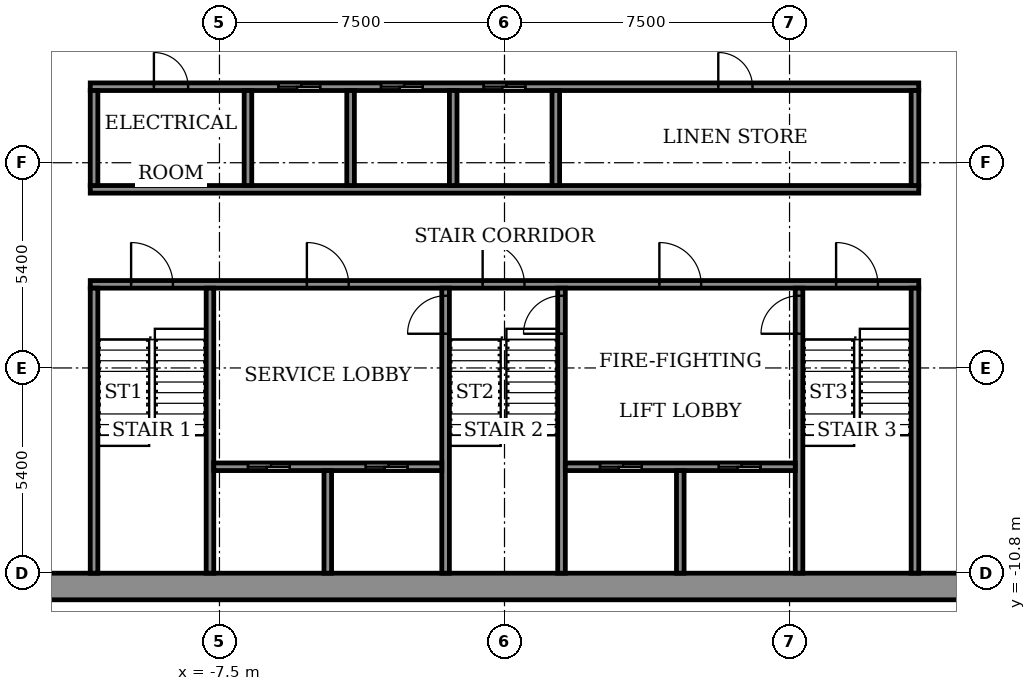
"""IFC4 building model, lengths in metres.
Left out: names, types, materials, properties, quantities, classifications, styles, units other than length and angle.
Written with IfcOpenShell. Run it as: python <this file> out.ifc"""

import sys

from ifc_helpers import new_model, si_unit, direction, frame, frame_2d, origin, place, context, subcontext, project, spatial, rectangle, extrude, element, fill, save


model = new_model("IFC4")
c1 = context("Model", 3, precision=1e-05, world=origin(), true_north=direction((0.0, 1.0)))
c2 = subcontext(c1, "Body", "Model", "MODEL_VIEW")
j1 = project(units=[si_unit("LENGTHUNIT", "METRE"), si_unit("PLANEANGLEUNIT", "RADIAN")], contexts=[c1])
p1 = place(None, origin())
s1 = spatial("IfcSite", under=j1, at=p1, CompositionType="ELEMENT")
p2 = place(p1, origin())
s2 = spatial("IfcBuilding", under=s1, at=p2, CompositionType="ELEMENT")
p3 = place(p2, frame((0.0, 0.0, 297.9)))
s3 = spatial("IfcBuildingStorey", under=s2, at=p3, CompositionType="ELEMENT", Elevation=297.9)
p4 = place(p3, frame((-14.5, -11.15, 0.0), z_axis=(0.0, 0.0, 1.0), x_axis=(1.0, 0.0, 0.0)))
e1 = element("IfcWall", 1, at=p4, inside=s3, PredefinedType="SHEAR", context=c2, shape_type="SweptSolid", body=[
    extrude(rectangle(XDim=29.0, YDim=0.7, at=frame_2d((14.5, 0.0))), origin(), (0.0, 0.0, 1.0), 3.6),
])
p5 = place(p3, frame((-10.9, -3.2, 0.0), z_axis=(0.0, 0.0, 1.0), x_axis=(1.0, 0.0, 0.0)))
e2 = element("IfcWall", 2, at=p5, inside=s3, PredefinedType="SHEAR", context=c2, shape_type="SweptSolid", body=[
    extrude(rectangle(XDim=21.8, YDim=0.2, at=frame_2d((10.9, 0.0))), origin(), (0.0, 0.0, 1.0), 3.05),
])
p6 = place(p5, frame((1.075, 0.0, 0.0)))
e3 = element("IfcOpeningElement", 3, at=p6, cuts=e2, PredefinedType="OPENING", context=c2, shape_type="SweptSolid", body=[
    extrude(rectangle(XDim=1.1, YDim=2.1, at=frame_2d((0.55, 1.05))), frame((0.0, 0.11, 0.0), z_axis=(0.0, -1.0, 0.0), x_axis=(1.0, 0.0, 0.0)), (0.0, 0.0, 1.0), 0.22),
])
p7 = place(p5, frame((10.325, 0.0, 0.0)))
e4 = element("IfcOpeningElement", 4, at=p7, cuts=e2, PredefinedType="OPENING", context=c2, shape_type="SweptSolid", body=[
    extrude(rectangle(XDim=1.1, YDim=2.1, at=frame_2d((0.55, 1.05))), frame((0.0, 0.11, 0.0), z_axis=(0.0, -1.0, 0.0), x_axis=(1.0, 0.0, 0.0)), (0.0, 0.0, 1.0), 0.22),
])
p8 = place(p5, frame((19.625, 0.0, 0.0)))
e5 = element("IfcOpeningElement", 5, at=p8, cuts=e2, PredefinedType="OPENING", context=c2, shape_type="SweptSolid", body=[
    extrude(rectangle(XDim=1.1, YDim=2.1, at=frame_2d((0.55, 1.05))), frame((0.0, 0.11, 0.0), z_axis=(0.0, -1.0, 0.0), x_axis=(1.0, 0.0, 0.0)), (0.0, 0.0, 1.0), 0.22),
])
p9 = place(p5, frame((5.7, 0.0, 0.0)))
e6 = element("IfcOpeningElement", 6, at=p9, cuts=e2, PredefinedType="OPENING", context=c2, shape_type="SweptSolid", body=[
    extrude(rectangle(XDim=1.1, YDim=2.1, at=frame_2d((0.55, 1.05))), frame((0.0, 0.11, 0.0), z_axis=(0.0, -1.0, 0.0), x_axis=(1.0, 0.0, 0.0)), (0.0, 0.0, 1.0), 0.22),
])
p10 = place(p5, frame((14.975, 0.0, 0.0)))
e7 = element("IfcOpeningElement", 7, at=p10, cuts=e2, PredefinedType="OPENING", context=c2, shape_type="SweptSolid", body=[
    extrude(rectangle(XDim=1.1, YDim=2.1, at=frame_2d((0.55, 1.05))), frame((0.0, 0.11, 0.0), z_axis=(0.0, -1.0, 0.0), x_axis=(1.0, 0.0, 0.0)), (0.0, 0.0, 1.0), 0.22),
])
p11 = place(p3, frame((-10.9, -0.7, 0.0), z_axis=(0.0, 0.0, 1.0), x_axis=(1.0, 0.0, 0.0)))
e8 = element("IfcWall", 8, at=p11, inside=s3, PredefinedType="SHEAR", context=c2, shape_type="SweptSolid", body=[
    extrude(rectangle(XDim=21.8, YDim=0.2, at=frame_2d((10.9, 0.0))), origin(), (0.0, 0.0, 1.0), 3.05),
])
p12 = place(p3, frame((-10.9, 2.0, 0.0), z_axis=(0.0, 0.0, 1.0), x_axis=(1.0, 0.0, 0.0)))
e9 = element("IfcWall", 9, at=p12, inside=s3, PredefinedType="SHEAR", context=c2, shape_type="SweptSolid", body=[
    extrude(rectangle(XDim=21.8, YDim=0.2, at=frame_2d((10.9, 0.0))), origin(), (0.0, 0.0, 1.0), 3.05),
])
p13 = place(p12, frame((4.95, 0.0, 0.0)))
e10 = element("IfcOpeningElement", 10, at=p13, cuts=e9, PredefinedType="OPENING", context=c2, shape_type="SweptSolid", body=[
    extrude(rectangle(XDim=1.1, YDim=2.1, at=frame_2d((0.55, 1.05))), frame((0.0, 0.11, 0.0), z_axis=(0.0, -1.0, 0.0), x_axis=(1.0, 0.0, 0.0)), (0.0, 0.0, 1.0), 0.22),
])
p14 = place(p12, frame((7.65, 0.0, 0.0)))
e11 = element("IfcOpeningElement", 11, at=p14, cuts=e9, PredefinedType="OPENING", context=c2, shape_type="SweptSolid", body=[
    extrude(rectangle(XDim=1.1, YDim=2.1, at=frame_2d((0.55, 1.05))), frame((0.0, 0.11, 0.0), z_axis=(0.0, -1.0, 0.0), x_axis=(1.0, 0.0, 0.0)), (0.0, 0.0, 1.0), 0.22),
])
p15 = place(p12, frame((10.35, 0.0, 0.0)))
e12 = element("IfcOpeningElement", 12, at=p15, cuts=e9, PredefinedType="OPENING", context=c2, shape_type="SweptSolid", body=[
    extrude(rectangle(XDim=1.1, YDim=2.1, at=frame_2d((0.55, 1.05))), frame((0.0, 0.11, 0.0), z_axis=(0.0, -1.0, 0.0), x_axis=(1.0, 0.0, 0.0)), (0.0, 0.0, 1.0), 0.22),
])
p16 = place(p12, frame((1.675, 0.0, 0.0)))
e13 = element("IfcOpeningElement", 13, at=p16, cuts=e9, PredefinedType="OPENING", context=c2, shape_type="SweptSolid", body=[
    extrude(rectangle(XDim=0.9, YDim=2.1, at=frame_2d((0.45, 1.05))), frame((0.0, 0.11, 0.0), z_axis=(0.0, -1.0, 0.0), x_axis=(1.0, 0.0, 0.0)), (0.0, 0.0, 1.0), 0.22),
])
p17 = place(p12, frame((16.525, 0.0, 0.0)))
e14 = element("IfcOpeningElement", 14, at=p17, cuts=e9, PredefinedType="OPENING", context=c2, shape_type="SweptSolid", body=[
    extrude(rectangle(XDim=0.9, YDim=2.1, at=frame_2d((0.45, 1.05))), frame((0.0, 0.11, 0.0), z_axis=(0.0, -1.0, 0.0), x_axis=(1.0, 0.0, 0.0)), (0.0, 0.0, 1.0), 0.22),
])
for number, where, z_axis, x_axis in (
    (15, (-10.8, -10.8, 0.0), (0.0, 0.0, 1.0), (0.0, 1.0, 0.0)),
    (16, (-7.75, -10.8, 0.0), (0.0, 0.0, 1.0), (0.0, 1.0, 0.0)),
):
    element("IfcWall", number, at=place(p3, frame(where, z_axis=z_axis, x_axis=x_axis)), inside=s3, PredefinedType="SHEAR", context=c2, shape_type="SweptSolid", body=[
        extrude(rectangle(XDim=7.5, YDim=0.2, at=frame_2d((3.75, 0.0))), origin(), (0.0, 0.0, 1.0), 3.05),
    ])
p18 = place(p3, frame((-1.55, -10.8, 0.0), z_axis=(0.0, 0.0, 1.0), x_axis=(0.0, 1.0, 0.0)))
e17 = element("IfcWall", 17, at=p18, inside=s3, PredefinedType="SHEAR", context=c2, shape_type="SweptSolid", body=[
    extrude(rectangle(XDim=7.5, YDim=0.2, at=frame_2d((3.75, 0.0))), origin(), (0.0, 0.0, 1.0), 3.05),
])
p19 = place(p18, frame((6.3, 0.0, 0.0)))
e18 = element("IfcOpeningElement", 18, at=p19, cuts=e17, PredefinedType="OPENING", context=c2, shape_type="SweptSolid", body=[
    extrude(rectangle(XDim=1.0, YDim=2.1, at=frame_2d((0.5, 1.05))), frame((0.0, 0.11, 0.0), z_axis=(0.0, -1.0, 0.0), x_axis=(1.0, 0.0, 0.0)), (0.0, 0.0, 1.0), 0.22),
])
p20 = place(p3, frame((1.5, -10.8, 0.0), z_axis=(0.0, 0.0, 1.0), x_axis=(0.0, 1.0, 0.0)))
e19 = element("IfcWall", 19, at=p20, inside=s3, PredefinedType="SHEAR", context=c2, shape_type="SweptSolid", body=[
    extrude(rectangle(XDim=7.5, YDim=0.2, at=frame_2d((3.75, 0.0))), origin(), (0.0, 0.0, 1.0), 3.05),
])
p21 = place(p20, frame((6.3, 0.0, 0.0)))
e20 = element("IfcOpeningElement", 20, at=p21, cuts=e19, PredefinedType="OPENING", context=c2, shape_type="SweptSolid", body=[
    extrude(rectangle(XDim=1.0, YDim=2.1, at=frame_2d((0.5, 1.05))), frame((0.0, 0.11, 0.0), z_axis=(0.0, -1.0, 0.0), x_axis=(1.0, 0.0, 0.0)), (0.0, 0.0, 1.0), 0.22),
])
p22 = place(p3, frame((7.75, -10.8, 0.0), z_axis=(0.0, 0.0, 1.0), x_axis=(0.0, 1.0, 0.0)))
e21 = element("IfcWall", 21, at=p22, inside=s3, PredefinedType="SHEAR", context=c2, shape_type="SweptSolid", body=[
    extrude(rectangle(XDim=7.5, YDim=0.2, at=frame_2d((3.75, 0.0))), origin(), (0.0, 0.0, 1.0), 3.05),
])
p23 = place(p22, frame((6.3, 0.0, 0.0)))
e22 = element("IfcOpeningElement", 22, at=p23, cuts=e21, PredefinedType="OPENING", context=c2, shape_type="SweptSolid", body=[
    extrude(rectangle(XDim=1.0, YDim=2.1, at=frame_2d((0.5, 1.05))), frame((0.0, 0.11, 0.0), z_axis=(0.0, -1.0, 0.0), x_axis=(1.0, 0.0, 0.0)), (0.0, 0.0, 1.0), 0.22),
])
p24 = place(p3, frame((10.8, -10.8, 0.0), z_axis=(0.0, 0.0, 1.0), x_axis=(0.0, 1.0, 0.0)))
e23 = element("IfcWall", 23, at=p24, inside=s3, PredefinedType="SHEAR", context=c2, shape_type="SweptSolid", body=[
    extrude(rectangle(XDim=7.5, YDim=0.2, at=frame_2d((3.75, 0.0))), origin(), (0.0, 0.0, 1.0), 3.05),
])
p25 = place(p3, frame((-7.65, -8.0, 0.0), z_axis=(0.0, 0.0, 1.0), x_axis=(1.0, 0.0, 0.0)))
e24 = element("IfcWall", 24, at=p25, inside=s3, PredefinedType="SHEAR", context=c2, shape_type="SweptSolid", body=[
    extrude(rectangle(XDim=6.0, YDim=0.2, at=frame_2d((3.0, 0.0))), origin(), (0.0, 0.0, 1.0), 3.05),
])
p26 = place(p25, frame((0.9, 0.0, 0.0)))
e25 = element("IfcOpeningElement", 25, at=p26, cuts=e24, PredefinedType="OPENING", context=c2, shape_type="SweptSolid", body=[
    extrude(rectangle(XDim=1.1, YDim=2.1, at=frame_2d((0.55, 1.05))), frame((0.0, 0.11, 0.0), z_axis=(0.0, -1.0, 0.0), x_axis=(1.0, 0.0, 0.0)), (0.0, 0.0, 1.0), 0.22),
])
p27 = place(p25, frame((4.0, 0.0, 0.0)))
e26 = element("IfcOpeningElement", 26, at=p27, cuts=e24, PredefinedType="OPENING", context=c2, shape_type="SweptSolid", body=[
    extrude(rectangle(XDim=1.1, YDim=2.1, at=frame_2d((0.55, 1.05))), frame((0.0, 0.11, 0.0), z_axis=(0.0, -1.0, 0.0), x_axis=(1.0, 0.0, 0.0)), (0.0, 0.0, 1.0), 0.22),
])
p28 = place(p3, frame((-4.65, -10.8, 0.0), z_axis=(0.0, 0.0, 1.0), x_axis=(0.0, 1.0, 0.0)))
e27 = element("IfcWall", 27, at=p28, inside=s3, PredefinedType="SHEAR", context=c2, shape_type="SweptSolid", body=[
    extrude(rectangle(XDim=2.7, YDim=0.2, at=frame_2d((1.35, 0.0))), origin(), (0.0, 0.0, 1.0), 3.05),
])
p29 = place(p3, frame((1.6, -8.0, 0.0), z_axis=(0.0, 0.0, 1.0), x_axis=(1.0, 0.0, 0.0)))
e28 = element("IfcWall", 28, at=p29, inside=s3, PredefinedType="SHEAR", context=c2, shape_type="SweptSolid", body=[
    extrude(rectangle(XDim=6.05, YDim=0.2, at=frame_2d((3.025, 0.0))), origin(), (0.0, 0.0, 1.0), 3.05),
])
p30 = place(p29, frame((0.913, 0.0, 0.0)))
e29 = element("IfcOpeningElement", 29, at=p30, cuts=e28, PredefinedType="OPENING", context=c2, shape_type="SweptSolid", body=[
    extrude(rectangle(XDim=1.1, YDim=2.1, at=frame_2d((0.55, 1.05))), frame((0.0, 0.11, 0.0), z_axis=(0.0, -1.0, 0.0), x_axis=(1.0, 0.0, 0.0)), (0.0, 0.0, 1.0), 0.22),
])
p31 = place(p29, frame((4.038, 0.0, 0.0)))
e30 = element("IfcOpeningElement", 30, at=p31, cuts=e28, PredefinedType="OPENING", context=c2, shape_type="SweptSolid", body=[
    extrude(rectangle(XDim=1.1, YDim=2.1, at=frame_2d((0.55, 1.05))), frame((0.0, 0.11, 0.0), z_axis=(0.0, -1.0, 0.0), x_axis=(1.0, 0.0, 0.0)), (0.0, 0.0, 1.0), 0.22),
])
p32 = place(p3, frame((4.625, -10.8, 0.0), z_axis=(0.0, 0.0, 1.0), x_axis=(0.0, 1.0, 0.0)))
e31 = element("IfcWall", 31, at=p32, inside=s3, PredefinedType="SHEAR", context=c2, shape_type="SweptSolid", body=[
    extrude(rectangle(XDim=2.7, YDim=0.2, at=frame_2d((1.35, 0.0))), origin(), (0.0, 0.0, 1.0), 3.05),
])
p33 = place(p3, frame((-10.8, -0.6, 0.0), z_axis=(0.0, 0.0, 1.0), x_axis=(0.0, 1.0, 0.0)))
e32 = element("IfcWall", 32, at=p33, inside=s3, PredefinedType="STANDARD", context=c2, shape_type="SweptSolid", body=[
    extrude(rectangle(XDim=2.5, YDim=0.2, at=frame_2d((1.25, 0.0))), origin(), (0.0, 0.0, 1.0), 3.05),
])
for number, where, z_axis, x_axis in (
    (33, (-6.75, -0.6, 0.0), (0.0, 0.0, 1.0), (0.0, 1.0, 0.0)),
    (34, (-4.05, -0.6, 0.0), (0.0, 0.0, 1.0), (0.0, 1.0, 0.0)),
    (35, (-1.35, -0.6, 0.0), (0.0, 0.0, 1.0), (0.0, 1.0, 0.0)),
    (36, (1.35, -0.6, 0.0), (0.0, 0.0, 1.0), (0.0, 1.0, 0.0)),
):
    element("IfcWall", number, at=place(p3, frame(where, z_axis=z_axis, x_axis=x_axis)), inside=s3, PredefinedType="SHEAR", context=c2, shape_type="SweptSolid", body=[
        extrude(rectangle(XDim=2.5, YDim=0.2, at=frame_2d((1.25, 0.0))), origin(), (0.0, 0.0, 1.0), 3.05),
    ])
p34 = place(p3, frame((10.8, -0.6, 0.0), z_axis=(0.0, 0.0, 1.0), x_axis=(0.0, 1.0, 0.0)))
e37 = element("IfcWall", 37, at=p34, inside=s3, PredefinedType="STANDARD", context=c2, shape_type="SweptSolid", body=[
    extrude(rectangle(XDim=2.5, YDim=0.2, at=frame_2d((1.25, 0.0))), origin(), (0.0, 0.0, 1.0), 3.05),
])
p35 = place(p13, origin())
e38 = element("IfcDoor", 38, at=p35, inside=s3, OperationType="SLIDING_TO_LEFT", PredefinedType="DOOR", context=c2, shape_type="SweptSolid", body=[
    extrude(rectangle(XDim=1.1, YDim=2.1, at=frame_2d((0.55, 1.05))), frame((0.0, 0.025, 0.0), z_axis=(0.0, -1.0, 0.0), x_axis=(1.0, 0.0, 0.0)), (0.0, 0.0, 1.0), 0.05),
])
fill(e10, e38)
p36 = place(p14, origin())
e39 = element("IfcDoor", 39, at=p36, inside=s3, OperationType="SLIDING_TO_LEFT", PredefinedType="DOOR", context=c2, shape_type="SweptSolid", body=[
    extrude(rectangle(XDim=1.1, YDim=2.1, at=frame_2d((0.55, 1.05))), frame((0.0, 0.025, 0.0), z_axis=(0.0, -1.0, 0.0), x_axis=(1.0, 0.0, 0.0)), (0.0, 0.0, 1.0), 0.05),
])
fill(e11, e39)
p37 = place(p15, origin())
e40 = element("IfcDoor", 40, at=p37, inside=s3, OperationType="SLIDING_TO_LEFT", PredefinedType="DOOR", context=c2, shape_type="SweptSolid", body=[
    extrude(rectangle(XDim=1.1, YDim=2.1, at=frame_2d((0.55, 1.05))), frame((0.0, 0.025, 0.0), z_axis=(0.0, -1.0, 0.0), x_axis=(1.0, 0.0, 0.0)), (0.0, 0.0, 1.0), 0.05),
])
fill(e12, e40)
p38 = place(p16, origin())
e41 = element("IfcDoor", 41, at=p38, inside=s3, OperationType="SINGLE_SWING_LEFT", PredefinedType="DOOR", context=c2, shape_type="SweptSolid", body=[
    extrude(rectangle(XDim=0.9, YDim=2.1, at=frame_2d((0.45, 1.05))), frame((0.0, 0.025, 0.0), z_axis=(0.0, -1.0, 0.0), x_axis=(1.0, 0.0, 0.0)), (0.0, 0.0, 1.0), 0.05),
])
fill(e13, e41)
p39 = place(p17, origin())
e42 = element("IfcDoor", 42, at=p39, inside=s3, OperationType="SINGLE_SWING_RIGHT", PredefinedType="DOOR", context=c2, shape_type="SweptSolid", body=[
    extrude(rectangle(XDim=0.9, YDim=2.1, at=frame_2d((0.45, 1.05))), frame((0.0, 0.025, 0.0), z_axis=(0.0, -1.0, 0.0), x_axis=(1.0, 0.0, 0.0)), (0.0, 0.0, 1.0), 0.05),
])
fill(e14, e42)
p40 = place(p30, origin())
e43 = element("IfcDoor", 43, at=p40, inside=s3, OperationType="SLIDING_TO_LEFT", PredefinedType="DOOR", context=c2, shape_type="SweptSolid", body=[
    extrude(rectangle(XDim=1.1, YDim=2.1, at=frame_2d((0.55, 1.05))), frame((0.0, 0.025, 0.0), z_axis=(0.0, -1.0, 0.0), x_axis=(1.0, 0.0, 0.0)), (0.0, 0.0, 1.0), 0.05),
])
fill(e29, e43)
p41 = place(p26, origin())
e44 = element("IfcDoor", 44, at=p41, inside=s3, OperationType="SLIDING_TO_LEFT", PredefinedType="DOOR", context=c2, shape_type="SweptSolid", body=[
    extrude(rectangle(XDim=1.1, YDim=2.1, at=frame_2d((0.55, 1.05))), frame((0.0, 0.025, 0.0), z_axis=(0.0, -1.0, 0.0), x_axis=(1.0, 0.0, 0.0)), (0.0, 0.0, 1.0), 0.05),
])
fill(e25, e44)
p42 = place(p31, origin())
e45 = element("IfcDoor", 45, at=p42, inside=s3, OperationType="SLIDING_TO_LEFT", PredefinedType="DOOR", context=c2, shape_type="SweptSolid", body=[
    extrude(rectangle(XDim=1.1, YDim=2.1, at=frame_2d((0.55, 1.05))), frame((0.0, 0.025, 0.0), z_axis=(0.0, -1.0, 0.0), x_axis=(1.0, 0.0, 0.0)), (0.0, 0.0, 1.0), 0.05),
])
fill(e30, e45)
p43 = place(p27, origin())
e46 = element("IfcDoor", 46, at=p43, inside=s3, OperationType="SLIDING_TO_LEFT", PredefinedType="DOOR", context=c2, shape_type="SweptSolid", body=[
    extrude(rectangle(XDim=1.1, YDim=2.1, at=frame_2d((0.55, 1.05))), frame((0.0, 0.025, 0.0), z_axis=(0.0, -1.0, 0.0), x_axis=(1.0, 0.0, 0.0)), (0.0, 0.0, 1.0), 0.05),
])
fill(e26, e46)
p44 = place(p6, origin())
e47 = element("IfcDoor", 47, at=p44, inside=s3, OperationType="SINGLE_SWING_RIGHT", PredefinedType="DOOR", context=c2, shape_type="SweptSolid", body=[
    extrude(rectangle(XDim=1.1, YDim=2.1, at=frame_2d((0.55, 1.05))), frame((0.0, 0.025, 0.0), z_axis=(0.0, -1.0, 0.0), x_axis=(1.0, 0.0, 0.0)), (0.0, 0.0, 1.0), 0.05),
])
fill(e3, e47)
p45 = place(p7, origin())
e48 = element("IfcDoor", 48, at=p45, inside=s3, OperationType="SINGLE_SWING_RIGHT", PredefinedType="DOOR", context=c2, shape_type="SweptSolid", body=[
    extrude(rectangle(XDim=1.1, YDim=2.1, at=frame_2d((0.55, 1.05))), frame((0.0, 0.025, 0.0), z_axis=(0.0, -1.0, 0.0), x_axis=(1.0, 0.0, 0.0)), (0.0, 0.0, 1.0), 0.05),
])
fill(e4, e48)
p46 = place(p8, origin())
e49 = element("IfcDoor", 49, at=p46, inside=s3, OperationType="SINGLE_SWING_RIGHT", PredefinedType="DOOR", context=c2, shape_type="SweptSolid", body=[
    extrude(rectangle(XDim=1.1, YDim=2.1, at=frame_2d((0.55, 1.05))), frame((0.0, 0.025, 0.0), z_axis=(0.0, -1.0, 0.0), x_axis=(1.0, 0.0, 0.0)), (0.0, 0.0, 1.0), 0.05),
])
fill(e5, e49)
p47 = place(p9, origin())
e50 = element("IfcDoor", 50, at=p47, inside=s3, OperationType="SINGLE_SWING_LEFT", PredefinedType="DOOR", context=c2, shape_type="SweptSolid", body=[
    extrude(rectangle(XDim=1.1, YDim=2.1, at=frame_2d((0.55, 1.05))), frame((0.0, 0.025, 0.0), z_axis=(0.0, -1.0, 0.0), x_axis=(1.0, 0.0, 0.0)), (0.0, 0.0, 1.0), 0.05),
])
fill(e6, e50)
p48 = place(p10, origin())
e51 = element("IfcDoor", 51, at=p48, inside=s3, OperationType="SINGLE_SWING_LEFT", PredefinedType="DOOR", context=c2, shape_type="SweptSolid", body=[
    extrude(rectangle(XDim=1.1, YDim=2.1, at=frame_2d((0.55, 1.05))), frame((0.0, 0.025, 0.0), z_axis=(0.0, -1.0, 0.0), x_axis=(1.0, 0.0, 0.0)), (0.0, 0.0, 1.0), 0.05),
])
fill(e7, e51)
p49 = place(p19, origin())
e52 = element("IfcDoor", 52, at=p49, inside=s3, OperationType="SINGLE_SWING_RIGHT", PredefinedType="DOOR", context=c2, shape_type="SweptSolid", body=[
    extrude(rectangle(XDim=1.0, YDim=2.1, at=frame_2d((0.5, 1.05))), frame((0.0, 0.025, 0.0), z_axis=(0.0, -1.0, 0.0), x_axis=(1.0, 0.0, 0.0)), (0.0, 0.0, 1.0), 0.05),
])
fill(e18, e52)
p50 = place(p21, origin())
e53 = element("IfcDoor", 53, at=p50, inside=s3, OperationType="SINGLE_SWING_RIGHT", PredefinedType="DOOR", context=c2, shape_type="SweptSolid", body=[
    extrude(rectangle(XDim=1.0, YDim=2.1, at=frame_2d((0.5, 1.05))), frame((0.0, 0.025, 0.0), z_axis=(0.0, -1.0, 0.0), x_axis=(1.0, 0.0, 0.0)), (0.0, 0.0, 1.0), 0.05),
])
fill(e20, e53)
p51 = place(p23, origin())
e54 = element("IfcDoor", 54, at=p51, inside=s3, OperationType="SINGLE_SWING_RIGHT", PredefinedType="DOOR", context=c2, shape_type="SweptSolid", body=[
    extrude(rectangle(XDim=1.0, YDim=2.1, at=frame_2d((0.5, 1.05))), frame((0.0, 0.025, 0.0), z_axis=(0.0, -1.0, 0.0), x_axis=(1.0, 0.0, 0.0)), (0.0, 0.0, 1.0), 0.05),
])
fill(e22, e54)
save(model, sys.argv[1])
